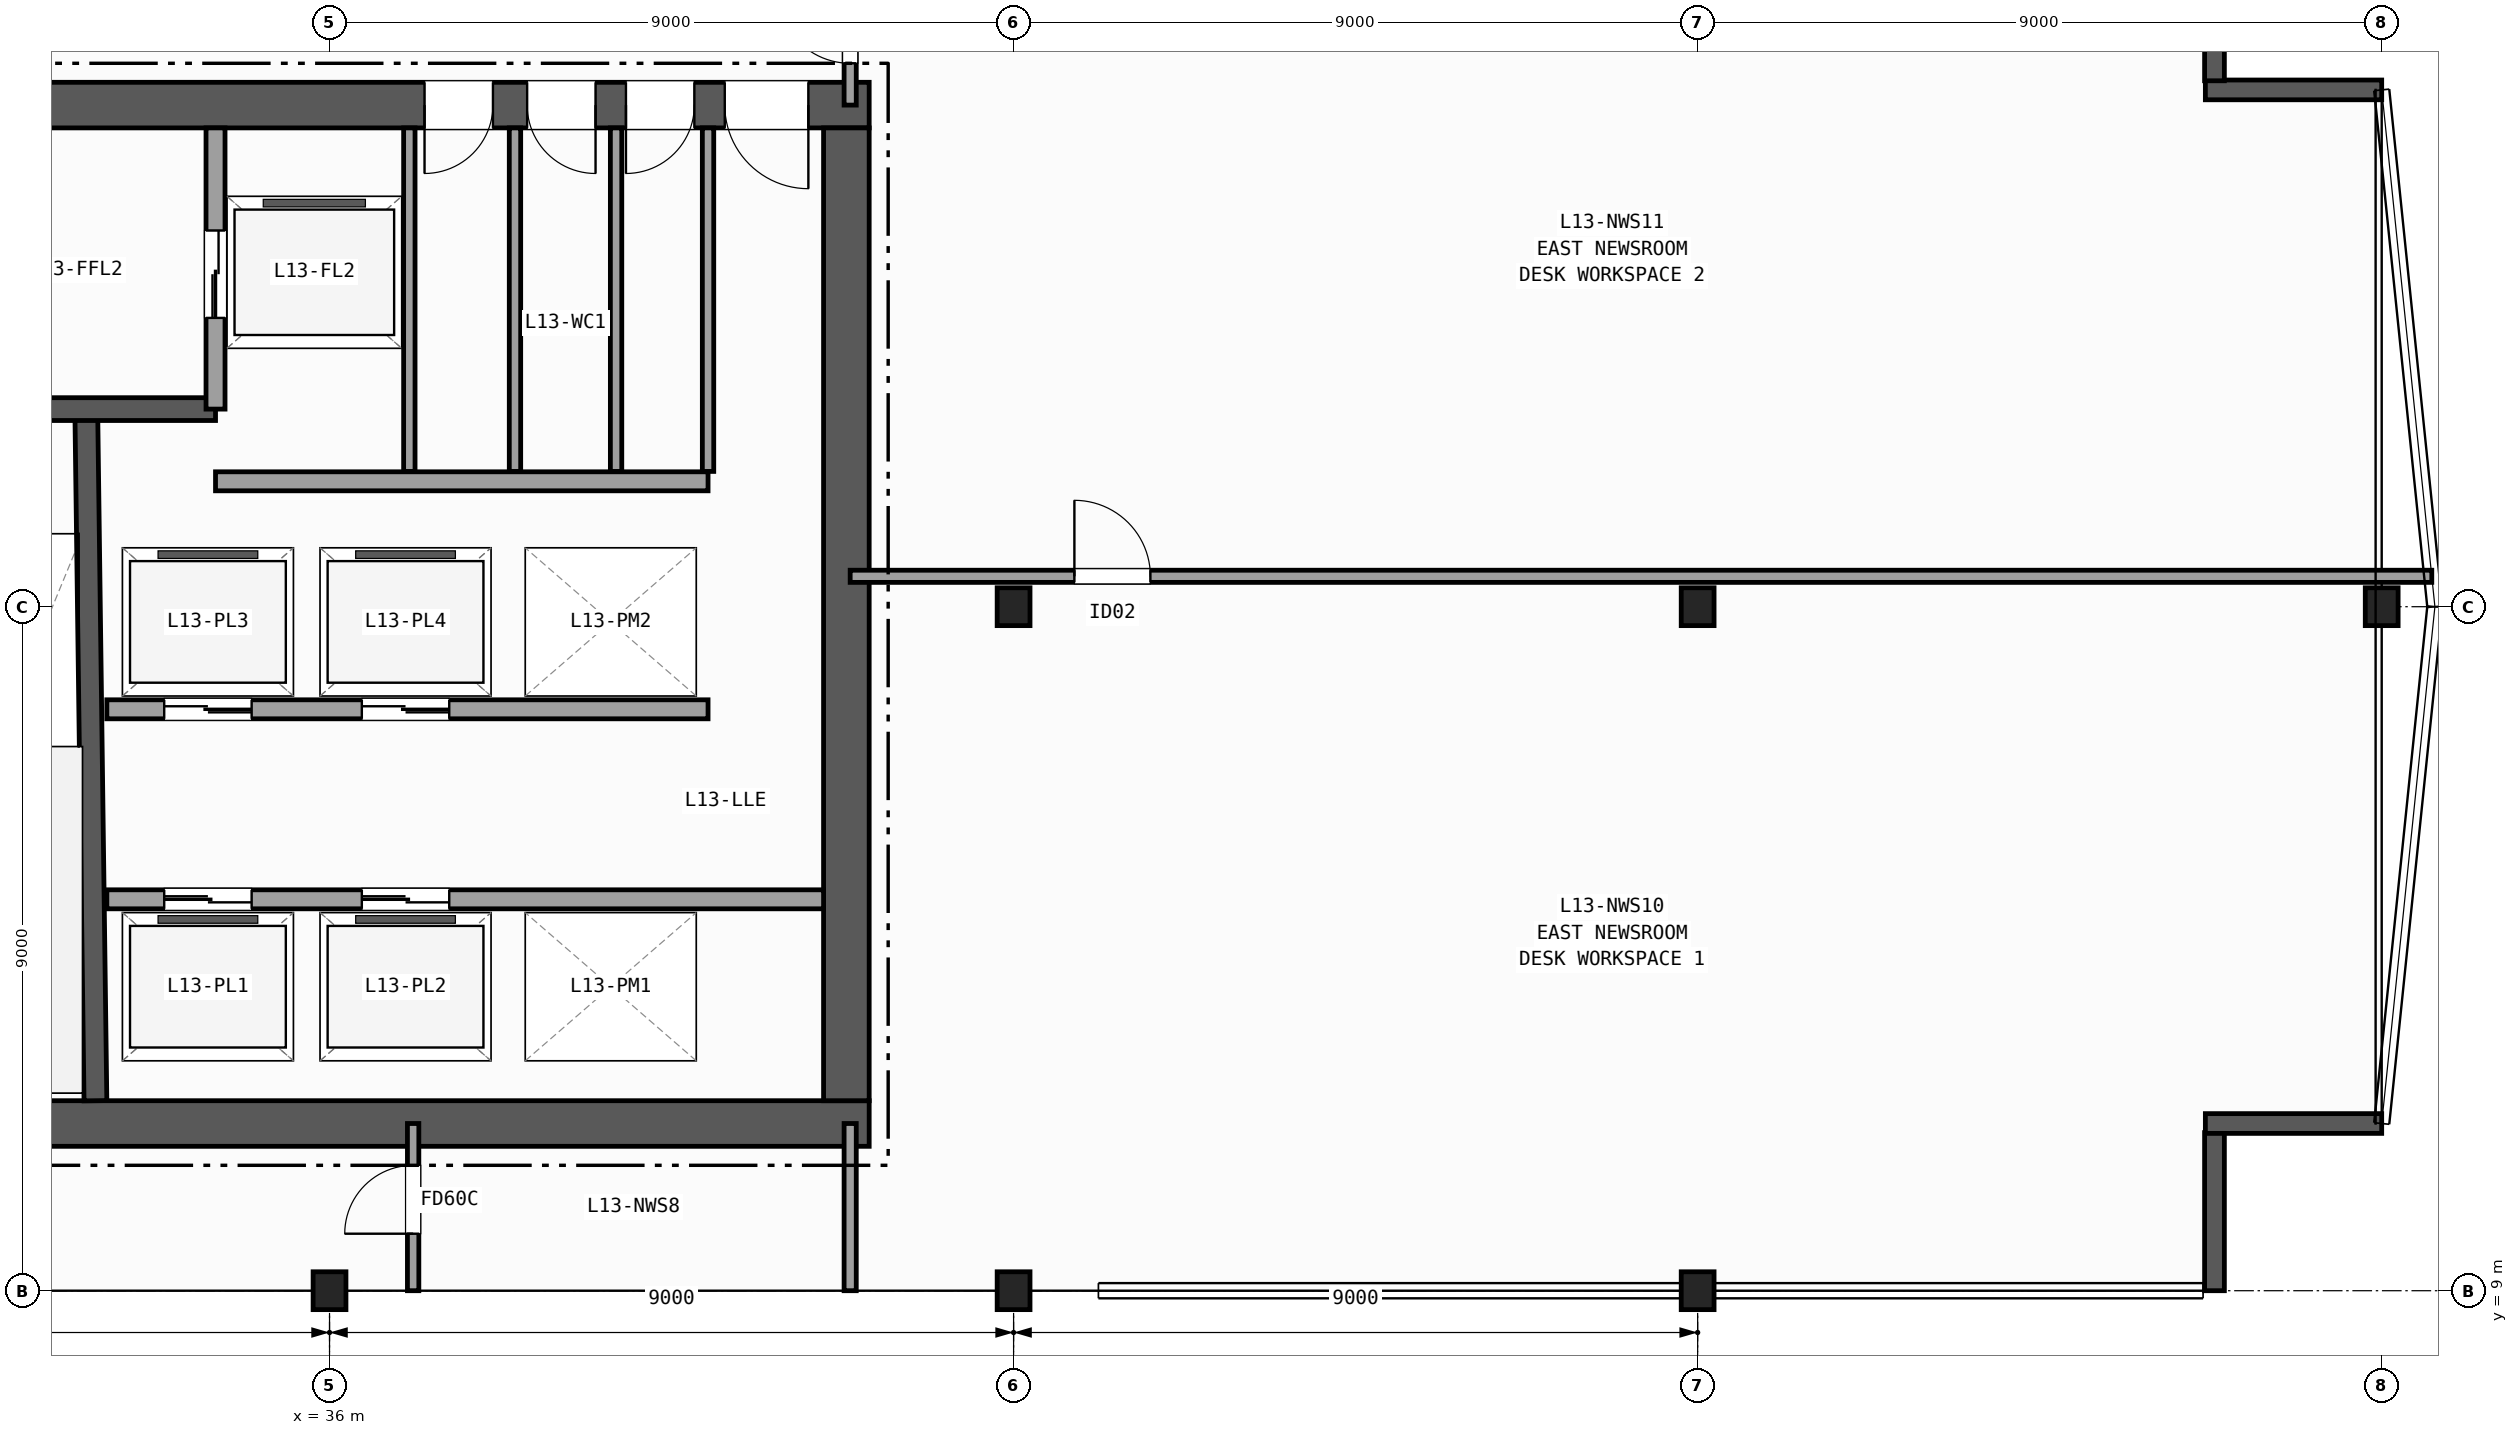
"""IFC4 building model, lengths in metres.
Left out: names, types, materials, properties, quantities, classifications, styles, units other than length and angle.
Written with IfcOpenShell. Run it as: python <this file> out.ifc"""

import sys

from ifc_helpers import new_model, si_unit, direction, frame, frame_2d, origin, origin_2d, place, context, subcontext, project, spatial, rectangle, i_section, extrude, element, fill, save


model = new_model("IFC4")
c1 = context("Model", 3, precision=1e-05, world=origin(), true_north=direction((0.0, 1.0)))
c2 = subcontext(c1, "Body", "Model", "MODEL_VIEW")
j1 = project(units=[si_unit("LENGTHUNIT", "METRE"), si_unit("PLANEANGLEUNIT", "RADIAN")], contexts=[c1])
p1 = place(None, origin())
s1 = spatial("IfcSite", under=j1, at=p1, CompositionType="ELEMENT")
p2 = place(p1, origin())
s2 = spatial("IfcBuilding", under=s1, at=p2, CompositionType="ELEMENT")
p3 = place(p2, frame((0.0, 0.0, 58.2)))
s3 = spatial("IfcBuildingStorey", under=s2, at=p3, CompositionType="ELEMENT", Elevation=58.2)
for number, where, z_axis, x_axis in (
    (1, (36.0, 9.0, 0.0), (0.0, 0.0, 1.0), (1.0, 0.0, 0.0)),
    (2, (45.0, 9.0, 0.0), (0.0, 0.0, 1.0), (1.0, 0.0, 0.0)),
    (3, (45.0, 18.0, 0.0), (0.0, 0.0, 1.0), (1.0, 0.0, 0.0)),
    (4, (54.0, 9.0, 0.0), (0.0, 0.0, 1.0), (1.0, 0.0, 0.0)),
    (5, (54.0, 18.0, 0.0), (0.0, 0.0, 1.0), (1.0, 0.0, 0.0)),
    (6, (63.0, 18.0, 0.0), (0.0, 0.0, 1.0), (1.0, 0.0, 0.0)),
):
    element("IfcColumn", number, at=place(p3, frame(where, z_axis=z_axis, x_axis=x_axis)), inside=s3, PredefinedType="COLUMN", context=c2, shape_type="SweptSolid", body=[
        extrude(i_section(OverallWidth=0.432, OverallDepth=0.498, WebThickness=0.056, FlangeThickness=0.089, FilletRadius=0.015, at=origin_2d()), origin(), (0.0, 0.0, 1.0), 3.7),
    ])
p4 = place(p3, frame((60.8, 9.0, 0.0), z_axis=(0.0, 0.0, 1.0), x_axis=(0.0, 1.0, 0.0)))
e7 = element("IfcWall", 7, at=p4, inside=s3, PredefinedType="SOLIDWALL", context=c2, shape_type="SweptSolid", body=[
    extrude(rectangle(XDim=2.08, YDim=0.26, at=frame_2d((1.04, 0.0))), origin(), (0.0, 0.0, 1.0), 3.42),
])
for number, where, z_axis, x_axis in (
    (8, (60.68, 11.2, 0.0), (0.0, 0.0, 1.0), (1.0, 0.0, 0.0)),
    (9, (63.0, 24.8, 0.0), (0.0, 0.0, 1.0), (-1.0, 0.0, 0.0)),
):
    element("IfcWall", number, at=place(p3, frame(where, z_axis=z_axis, x_axis=x_axis)), inside=s3, PredefinedType="SOLIDWALL", context=c2, shape_type="SweptSolid", body=[
        extrude(rectangle(XDim=2.32, YDim=0.26, at=frame_2d((1.16, 0.0))), origin(), (0.0, 0.0, 1.0), 3.42),
    ])
p5 = place(p3, frame((60.8, 24.92, 0.0), z_axis=(0.0, 0.0, 1.0), x_axis=(0.0, 1.0, 0.0)))
e10 = element("IfcWall", 10, at=p5, inside=s3, PredefinedType="SOLIDWALL", context=c2, shape_type="SweptSolid", body=[
    extrude(rectangle(XDim=2.08, YDim=0.26, at=frame_2d((1.04, 0.0))), origin(), (0.0, 0.0, 1.0), 3.42),
])
p6 = place(p3, frame((29.1, 11.2, 0.0), z_axis=(0.0, 0.0, 1.0), x_axis=(1.0, 0.0, 0.0)))
e11 = element("IfcWall", 11, at=p6, inside=s3, PredefinedType="SHEAR", context=c2, shape_type="SweptSolid", body=[
    extrude(rectangle(XDim=14.0, YDim=0.6, at=frame_2d((7.0, 0.0))), origin(), (0.0, 0.0, 1.0), 3.42),
])
p7 = place(p3, frame((43.1, 24.6, 0.0), z_axis=(0.0, 0.0, 1.0), x_axis=(-1.0, 0.0, 0.0)))
e12 = element("IfcWall", 12, at=p7, inside=s3, PredefinedType="SHEAR", context=c2, shape_type="SweptSolid", body=[
    extrude(rectangle(XDim=14.0, YDim=0.6, at=frame_2d((7.0, 0.0))), origin(), (0.0, 0.0, 1.0), 3.42),
])
p8 = place(p7, frame((0.8, 0.0, 0.0)))
e13 = element("IfcOpeningElement", 13, at=p8, cuts=e12, PredefinedType="OPENING", context=c2, shape_type="SweptSolid", body=[
    extrude(rectangle(XDim=1.1, YDim=2.15, at=frame_2d((0.55, 1.075))), frame((0.0, 0.31, 0.0), z_axis=(0.0, -1.0, 0.0), x_axis=(1.0, 0.0, 0.0)), (0.0, 0.0, 1.0), 0.62),
])
p9 = place(p7, frame((2.3, 0.0, 0.0)))
e14 = element("IfcOpeningElement", 14, at=p9, cuts=e12, PredefinedType="OPENING", context=c2, shape_type="SweptSolid", body=[
    extrude(rectangle(XDim=0.9, YDim=2.1, at=frame_2d((0.45, 1.05))), frame((0.0, 0.31, 0.0), z_axis=(0.0, -1.0, 0.0), x_axis=(1.0, 0.0, 0.0)), (0.0, 0.0, 1.0), 0.62),
])
p10 = place(p7, frame((3.6, 0.0, 0.0)))
e15 = element("IfcOpeningElement", 15, at=p10, cuts=e12, PredefinedType="OPENING", context=c2, shape_type="SweptSolid", body=[
    extrude(rectangle(XDim=0.9, YDim=2.1, at=frame_2d((0.45, 1.05))), frame((0.0, 0.31, 0.0), z_axis=(0.0, -1.0, 0.0), x_axis=(1.0, 0.0, 0.0)), (0.0, 0.0, 1.0), 0.62),
])
p11 = place(p7, frame((4.95, 0.0, 0.0)))
e16 = element("IfcOpeningElement", 16, at=p11, cuts=e12, PredefinedType="OPENING", context=c2, shape_type="SweptSolid", body=[
    extrude(rectangle(XDim=0.9, YDim=2.1, at=frame_2d((0.45, 1.05))), frame((0.0, 0.31, 0.0), z_axis=(0.0, -1.0, 0.0), x_axis=(1.0, 0.0, 0.0)), (0.0, 0.0, 1.0), 0.62),
])
p12 = place(p3, frame((42.8, 11.5, 0.0), z_axis=(0.0, 0.0, 1.0), x_axis=(0.0, 1.0, 0.0)))
e17 = element("IfcWall", 17, at=p12, inside=s3, PredefinedType="SHEAR", context=c2, shape_type="SweptSolid", body=[
    extrude(rectangle(XDim=12.8, YDim=0.6, at=frame_2d((6.4, 0.0))), origin(), (0.0, 0.0, 1.0), 3.42),
])
p13 = place(p3, frame((32.92, 11.5, 0.0), z_axis=(0.0, 0.0, 1.0), x_axis=(-0.013244407292, 0.999912288991, 0.0)))
e18 = element("IfcWall", 18, at=p13, inside=s3, PredefinedType="SHEAR", context=c2, shape_type="SweptSolid", body=[
    extrude(rectangle(XDim=9.051, YDim=0.3, at=frame_2d((4.525, 0.0))), origin(), (0.0, 0.0, 1.0), 3.42),
])
p14 = place(p3, frame((34.5, 20.6, 0.0), z_axis=(0.0, 0.0, 1.0), x_axis=(-1.0, 0.0, 0.0)))
e19 = element("IfcWall", 19, at=p14, inside=s3, PredefinedType="SHEAR", context=c2, shape_type="SweptSolid", body=[
    extrude(rectangle(XDim=4.8, YDim=0.3, at=frame_2d((2.4, 0.0))), origin(), (0.0, 0.0, 1.0), 3.42),
])
p15 = place(p14, frame((2.7, 0.0, 0.0)))
e20 = element("IfcOpeningElement", 20, at=p15, cuts=e19, PredefinedType="OPENING", context=c2, shape_type="SweptSolid", body=[
    extrude(rectangle(XDim=1.2, YDim=2.15, at=frame_2d((0.6, 1.075))), frame((0.0, 0.16, 0.0), z_axis=(0.0, -1.0, 0.0), x_axis=(1.0, 0.0, 0.0)), (0.0, 0.0, 1.0), 0.32),
])
p16 = place(p3, frame((34.5, 20.6, 0.0), z_axis=(0.0, 0.0, 1.0), x_axis=(0.0, 1.0, 0.0)))
e21 = element("IfcWall", 21, at=p16, inside=s3, PredefinedType="PARTITIONING", context=c2, shape_type="SweptSolid", body=[
    extrude(rectangle(XDim=3.7, YDim=0.25, at=frame_2d((1.85, 0.0))), origin(), (0.0, 0.0, 1.0), 3.42),
])
p17 = place(p16, frame((1.2, 0.0, 0.0)))
e22 = element("IfcOpeningElement", 22, at=p17, cuts=e21, PredefinedType="OPENING", context=c2, shape_type="SweptSolid", body=[
    extrude(rectangle(XDim=1.15, YDim=2.15, at=frame_2d((0.575, 1.075))), frame((0.0, 0.135, 0.0), z_axis=(0.0, -1.0, 0.0), x_axis=(1.0, 0.0, 0.0)), (0.0, 0.0, 1.0), 0.27),
])
p18 = place(p3, frame((34.5, 19.65, 0.0), z_axis=(0.0, 0.0, 1.0), x_axis=(1.0, 0.0, 0.0)))
e23 = element("IfcWall", 23, at=p18, inside=s3, PredefinedType="PARTITIONING", context=c2, shape_type="SweptSolid", body=[
    extrude(rectangle(XDim=6.48, YDim=0.25, at=frame_2d((3.24, 0.0))), origin(), (0.0, 0.0, 1.0), 3.42),
])
p19 = place(p3, frame((33.07, 14.15, 0.0), z_axis=(0.0, 0.0, 1.0), x_axis=(1.0, 0.0, 0.0)))
e24 = element("IfcWall", 24, at=p19, inside=s3, PredefinedType="PARTITIONING", context=c2, shape_type="SweptSolid", body=[
    extrude(rectangle(XDim=9.43, YDim=0.25, at=frame_2d((4.715, 0.0))), origin(), (0.0, 0.0, 1.0), 3.42),
])
p20 = place(p19, frame((0.755, 0.0, 0.0)))
e25 = element("IfcOpeningElement", 25, at=p20, cuts=e24, PredefinedType="OPENING", context=c2, shape_type="SweptSolid", body=[
    extrude(rectangle(XDim=1.15, YDim=2.15, at=frame_2d((0.575, 1.075))), frame((0.0, 0.135, 0.0), z_axis=(0.0, -1.0, 0.0), x_axis=(1.0, 0.0, 0.0)), (0.0, 0.0, 1.0), 0.27),
])
p21 = place(p19, frame((3.355, 0.0, 0.0)))
e26 = element("IfcOpeningElement", 26, at=p21, cuts=e24, PredefinedType="OPENING", context=c2, shape_type="SweptSolid", body=[
    extrude(rectangle(XDim=1.15, YDim=2.15, at=frame_2d((0.575, 1.075))), frame((0.0, 0.135, 0.0), z_axis=(0.0, -1.0, 0.0), x_axis=(1.0, 0.0, 0.0)), (0.0, 0.0, 1.0), 0.27),
])
p22 = place(p3, frame((40.98, 16.65, 0.0), z_axis=(0.0, 0.0, 1.0), x_axis=(-1.0, 0.0, 0.0)))
e27 = element("IfcWall", 27, at=p22, inside=s3, PredefinedType="PARTITIONING", context=c2, shape_type="SweptSolid", body=[
    extrude(rectangle(XDim=7.91, YDim=0.25, at=frame_2d((3.955, 0.0))), origin(), (0.0, 0.0, 1.0), 3.42),
])
p23 = place(p22, frame((6.005, 0.0, 0.0)))
e28 = element("IfcOpeningElement", 28, at=p23, cuts=e27, PredefinedType="OPENING", context=c2, shape_type="SweptSolid", body=[
    extrude(rectangle(XDim=1.15, YDim=2.15, at=frame_2d((0.575, 1.075))), frame((0.0, 0.135, 0.0), z_axis=(0.0, -1.0, 0.0), x_axis=(1.0, 0.0, 0.0)), (0.0, 0.0, 1.0), 0.27),
])
p24 = place(p22, frame((3.405, 0.0, 0.0)))
e29 = element("IfcOpeningElement", 29, at=p24, cuts=e27, PredefinedType="OPENING", context=c2, shape_type="SweptSolid", body=[
    extrude(rectangle(XDim=1.15, YDim=2.15, at=frame_2d((0.575, 1.075))), frame((0.0, 0.135, 0.0), z_axis=(0.0, -1.0, 0.0), x_axis=(1.0, 0.0, 0.0)), (0.0, 0.0, 1.0), 0.27),
])
for number, where, z_axis, x_axis in (
    (30, (37.05, 19.78, 0.0), (0.0, 0.0, 1.0), (0.0, 1.0, 0.0)),
    (31, (38.44, 19.78, 0.0), (0.0, 0.0, 1.0), (0.0, 1.0, 0.0)),
    (32, (39.77, 19.78, 0.0), (0.0, 0.0, 1.0), (0.0, 1.0, 0.0)),
    (33, (40.98, 19.78, 0.0), (0.0, 0.0, 1.0), (0.0, 1.0, 0.0)),
):
    element("IfcWall", number, at=place(p3, frame(where, z_axis=z_axis, x_axis=x_axis)), inside=s3, PredefinedType="PARTITIONING", context=c2, shape_type="SweptSolid", body=[
        extrude(rectangle(XDim=4.52, YDim=0.15, at=frame_2d((2.26, 0.0))), origin(), (0.0, 0.0, 1.0), 3.42),
    ])
p25 = place(p3, frame((37.1, 9.0, 0.0), z_axis=(0.0, 0.0, 1.0), x_axis=(0.0, 1.0, 0.0)))
e34 = element("IfcWall", 34, at=p25, inside=s3, PredefinedType="PARTITIONING", context=c2, shape_type="SweptSolid", body=[
    extrude(rectangle(XDim=2.2, YDim=0.15, at=frame_2d((1.1, 0.0))), origin(), (0.0, 0.0, 1.0), 2.627),
])
p26 = place(p25, frame((0.75, 0.0, 0.0)))
e35 = element("IfcOpeningElement", 35, at=p26, cuts=e34, PredefinedType="OPENING", context=c2, shape_type="SweptSolid", body=[
    extrude(rectangle(XDim=0.9, YDim=2.1, at=frame_2d((0.45, 1.05))), frame((0.0, 0.085, 0.0), z_axis=(0.0, -1.0, 0.0), x_axis=(1.0, 0.0, 0.0)), (0.0, 0.0, 1.0), 0.17),
])
p27 = place(p3, frame((42.85, 9.0, 0.0), z_axis=(0.0, 0.0, 1.0), x_axis=(0.0, 1.0, 0.0)))
e36 = element("IfcWall", 36, at=p27, inside=s3, PredefinedType="PARTITIONING", context=c2, shape_type="SweptSolid", body=[
    extrude(rectangle(XDim=2.2, YDim=0.16, at=frame_2d((1.1, 0.0))), origin(), (0.0, 0.0, 1.0), 2.627),
])
p28 = place(p3, frame((42.85, 24.6, 0.0), z_axis=(0.0, 0.0, 1.0), x_axis=(0.0, 1.0, 0.0)))
e37 = element("IfcWall", 37, at=p28, inside=s3, PredefinedType="PARTITIONING", context=c2, shape_type="SweptSolid", body=[
    extrude(rectangle(XDim=2.4, YDim=0.16, at=frame_2d((1.2, 0.0))), origin(), (0.0, 0.0, 1.0), 2.627),
])
p29 = place(p28, frame((0.55, 0.0, 0.0)))
e38 = element("IfcOpeningElement", 38, at=p29, cuts=e37, PredefinedType="OPENING", context=c2, shape_type="SweptSolid", body=[
    extrude(rectangle(XDim=0.95, YDim=2.1, at=frame_2d((0.475, 1.05))), frame((0.0, 0.09, 0.0), z_axis=(0.0, -1.0, 0.0), x_axis=(1.0, 0.0, 0.0)), (0.0, 0.0, 1.0), 0.18),
])
p30 = place(p3, frame((42.85, 18.4, 0.0), z_axis=(0.0, 0.0, 1.0), x_axis=(1.0, 0.0, 0.0)))
e39 = element("IfcWall", 39, at=p30, inside=s3, PredefinedType="PARTITIONING", context=c2, shape_type="SweptSolid", body=[
    extrude(rectangle(XDim=20.809, YDim=0.16, at=frame_2d((10.404, 0.0))), origin(), (0.0, 0.0, 1.0), 3.42),
])
p31 = place(p30, frame((2.95, 0.0, 0.0)))
e40 = element("IfcOpeningElement", 40, at=p31, cuts=e39, PredefinedType="OPENING", context=c2, shape_type="SweptSolid", body=[
    extrude(rectangle(XDim=1.0, YDim=2.1, at=frame_2d((0.5, 1.05))), frame((0.0, 0.09, 0.0), z_axis=(0.0, -1.0, 0.0), x_axis=(1.0, 0.0, 0.0)), (0.0, 0.0, 1.0), 0.18),
])
p32 = place(p8, origin())
e41 = element("IfcDoor", 41, at=p32, inside=s3, OperationType="SINGLE_SWING_LEFT", PredefinedType="DOOR", context=c2, shape_type="SweptSolid", body=[
    extrude(rectangle(XDim=1.1, YDim=2.15, at=frame_2d((0.55, 1.075))), frame((0.0, 0.025, 0.0), z_axis=(0.0, -1.0, 0.0), x_axis=(1.0, 0.0, 0.0)), (0.0, 0.0, 1.0), 0.05),
])
fill(e13, e41)
p33 = place(p9, origin())
e42 = element("IfcDoor", 42, at=p33, inside=s3, OperationType="SINGLE_SWING_RIGHT", PredefinedType="DOOR", context=c2, shape_type="SweptSolid", body=[
    extrude(rectangle(XDim=0.9, YDim=2.1, at=frame_2d((0.45, 1.05))), frame((0.0, 0.025, 0.0), z_axis=(0.0, -1.0, 0.0), x_axis=(1.0, 0.0, 0.0)), (0.0, 0.0, 1.0), 0.05),
])
fill(e14, e42)
p34 = place(p10, origin())
e43 = element("IfcDoor", 43, at=p34, inside=s3, OperationType="SINGLE_SWING_LEFT", PredefinedType="DOOR", context=c2, shape_type="SweptSolid", body=[
    extrude(rectangle(XDim=0.9, YDim=2.1, at=frame_2d((0.45, 1.05))), frame((0.0, 0.025, 0.0), z_axis=(0.0, -1.0, 0.0), x_axis=(1.0, 0.0, 0.0)), (0.0, 0.0, 1.0), 0.05),
])
fill(e15, e43)
p35 = place(p11, origin())
e44 = element("IfcDoor", 44, at=p35, inside=s3, OperationType="SINGLE_SWING_RIGHT", PredefinedType="DOOR", context=c2, shape_type="SweptSolid", body=[
    extrude(rectangle(XDim=0.9, YDim=2.1, at=frame_2d((0.45, 1.05))), frame((0.0, 0.025, 0.0), z_axis=(0.0, -1.0, 0.0), x_axis=(1.0, 0.0, 0.0)), (0.0, 0.0, 1.0), 0.05),
])
fill(e16, e44)
p36 = place(p17, origin())
e45 = element("IfcDoor", 45, at=p36, inside=s3, OperationType="DOUBLE_DOOR_SLIDING", PredefinedType="DOOR", context=c2, shape_type="SweptSolid", body=[
    extrude(rectangle(XDim=1.15, YDim=2.15, at=frame_2d((0.575, 1.075))), frame((0.0, 0.025, 0.0), z_axis=(0.0, -1.0, 0.0), x_axis=(1.0, 0.0, 0.0)), (0.0, 0.0, 1.0), 0.05),
])
fill(e22, e45)
p37 = place(p20, origin())
e46 = element("IfcDoor", 46, at=p37, inside=s3, OperationType="DOUBLE_DOOR_SLIDING", PredefinedType="DOOR", context=c2, shape_type="SweptSolid", body=[
    extrude(rectangle(XDim=1.15, YDim=2.15, at=frame_2d((0.575, 1.075))), frame((0.0, 0.025, 0.0), z_axis=(0.0, -1.0, 0.0), x_axis=(1.0, 0.0, 0.0)), (0.0, 0.0, 1.0), 0.05),
])
fill(e25, e46)
p38 = place(p21, origin())
e47 = element("IfcDoor", 47, at=p38, inside=s3, OperationType="DOUBLE_DOOR_SLIDING", PredefinedType="DOOR", context=c2, shape_type="SweptSolid", body=[
    extrude(rectangle(XDim=1.15, YDim=2.15, at=frame_2d((0.575, 1.075))), frame((0.0, 0.025, 0.0), z_axis=(0.0, -1.0, 0.0), x_axis=(1.0, 0.0, 0.0)), (0.0, 0.0, 1.0), 0.05),
])
fill(e26, e47)
p39 = place(p23, origin())
e48 = element("IfcDoor", 48, at=p39, inside=s3, OperationType="DOUBLE_DOOR_SLIDING", PredefinedType="DOOR", context=c2, shape_type="SweptSolid", body=[
    extrude(rectangle(XDim=1.15, YDim=2.15, at=frame_2d((0.575, 1.075))), frame((0.0, 0.025, 0.0), z_axis=(0.0, -1.0, 0.0), x_axis=(1.0, 0.0, 0.0)), (0.0, 0.0, 1.0), 0.05),
])
fill(e28, e48)
p40 = place(p24, origin())
e49 = element("IfcDoor", 49, at=p40, inside=s3, OperationType="DOUBLE_DOOR_SLIDING", PredefinedType="DOOR", context=c2, shape_type="SweptSolid", body=[
    extrude(rectangle(XDim=1.15, YDim=2.15, at=frame_2d((0.575, 1.075))), frame((0.0, 0.025, 0.0), z_axis=(0.0, -1.0, 0.0), x_axis=(1.0, 0.0, 0.0)), (0.0, 0.0, 1.0), 0.05),
])
fill(e29, e49)
p41 = place(p26, origin())
e50 = element("IfcDoor", 50, at=p41, inside=s3, OperationType="SINGLE_SWING_LEFT", PredefinedType="DOOR", context=c2, shape_type="SweptSolid", body=[
    extrude(rectangle(XDim=0.9, YDim=2.1, at=frame_2d((0.45, 1.05))), frame((0.0, 0.025, 0.0), z_axis=(0.0, -1.0, 0.0), x_axis=(1.0, 0.0, 0.0)), (0.0, 0.0, 1.0), 0.05),
])
fill(e35, e50)
p42 = place(p29, origin())
e51 = element("IfcDoor", 51, at=p42, inside=s3, OperationType="SINGLE_SWING_RIGHT", PredefinedType="DOOR", context=c2, shape_type="SweptSolid", body=[
    extrude(rectangle(XDim=0.95, YDim=2.1, at=frame_2d((0.475, 1.05))), frame((0.0, 0.025, 0.0), z_axis=(0.0, -1.0, 0.0), x_axis=(1.0, 0.0, 0.0)), (0.0, 0.0, 1.0), 0.05),
])
fill(e38, e51)
p43 = place(p31, origin())
e52 = element("IfcDoor", 52, at=p43, inside=s3, OperationType="SINGLE_SWING_LEFT", PredefinedType="DOOR", context=c2, shape_type="SweptSolid", body=[
    extrude(rectangle(XDim=1.0, YDim=2.1, at=frame_2d((0.5, 1.05))), frame((0.0, 0.025, 0.0), z_axis=(0.0, -1.0, 0.0), x_axis=(1.0, 0.0, 0.0)), (0.0, 0.0, 1.0), 0.05),
])
fill(e40, e52)
save(model, sys.argv[1])
